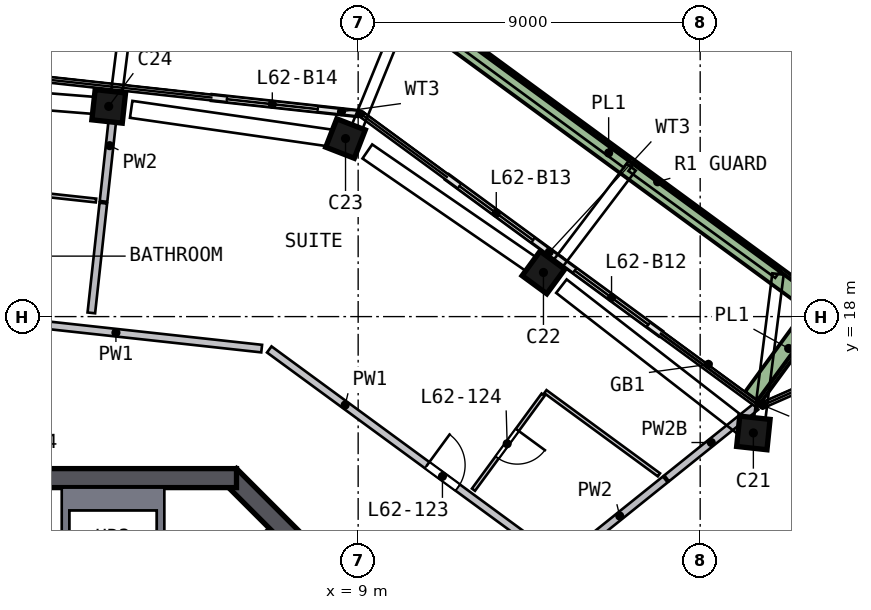
"""IFC4 building model, lengths in metres.
Left out: names, types, materials, properties, quantities, classifications, styles, units other than length and angle.
Written with IfcOpenShell. Run it as: python <this file> out.ifc"""

import sys

from ifc_helpers import new_model, si_unit, direction, frame, frame_2d, origin, origin_2d, place, context, subcontext, project, spatial, polyline, rectangle, outline, extrude, element, fill, save


model = new_model("IFC4")
c1 = context("Model", 3, precision=1e-05, world=origin(), true_north=direction((0.0, 1.0)))
c2 = subcontext(c1, "Body", "Model", "MODEL_VIEW")
j1 = project(units=[si_unit("LENGTHUNIT", "METRE"), si_unit("PLANEANGLEUNIT", "RADIAN")], contexts=[c1])
p1 = place(None, origin())
s1 = spatial("IfcSite", under=j1, at=p1, CompositionType="ELEMENT")
p2 = place(p1, origin())
s2 = spatial("IfcBuilding", under=s1, at=p2, CompositionType="ELEMENT")
p3 = place(p2, frame((0.0, 0.0, 252.5)))
s3 = spatial("IfcBuildingStorey", under=s2, at=p3, CompositionType="ELEMENT", Elevation=252.5)
p4 = place(p3, frame((19.485, 14.828, 0.0), z_axis=(-0.071225443, 0.092053374, 0.99320346), x_axis=(0.991526611, -0.101914305, 0.080550946)))
e1 = element("IfcColumn", 1, at=p4, inside=s3, PredefinedType="COLUMN", context=c2, shape_type="SweptSolid", body=[
    extrude(rectangle(XDim=0.8, YDim=0.8, at=origin_2d()), origin(), (0.0, 0.0, 1.0), 3.212),
])
p5 = place(p3, frame((13.986, 19.082, 0.0), z_axis=(-0.09133384, 0.065781659, 0.99364526), x_axis=(-0.80133178, 0.587536537, -0.112553082)))
e2 = element("IfcColumn", 2, at=p5, inside=s3, PredefinedType="COLUMN", context=c2, shape_type="SweptSolid", body=[
    extrude(rectangle(XDim=0.8, YDim=0.8, at=origin_2d()), origin(), (0.0, 0.0, 1.0), 3.21),
])
p6 = place(p3, frame((8.798, 22.636, 0.0), z_axis=(-0.107952091, 0.040976181, 0.99331128), x_axis=(0.925635524, -0.360370814, 0.115463211)))
e3 = element("IfcColumn", 3, at=p6, inside=s3, PredefinedType="COLUMN", context=c2, shape_type="SweptSolid", body=[
    extrude(rectangle(XDim=0.8, YDim=0.8, at=origin_2d()), origin(), (0.0, 0.0, 1.0), 3.211),
])
p7 = place(p3, frame((2.572, 23.518, 0.0), z_axis=(-0.112018614, 0.011255095, 0.993642367), x_axis=(-0.987786416, 0.107722097, -0.112578621)))
e4 = element("IfcColumn", 4, at=p7, inside=s3, PredefinedType="COLUMN", context=c2, shape_type="SweptSolid", body=[
    extrude(rectangle(XDim=0.8, YDim=0.8, at=origin_2d()), origin(), (0.0, 0.0, 1.0), 3.21),
])
p8 = place(p3, frame((13.823, 5.622, 0.0), z_axis=(0.0, 0.0, 1.0), x_axis=(-0.707106781, 0.707106781, 0.0)))
e5 = element("IfcWall", 5, at=p8, inside=s3, PredefinedType="SHEAR", context=c2, shape_type="SweptSolid", body=[
    extrude(rectangle(XDim=11.598, YDim=0.5, at=frame_2d((5.799, 0.0))), origin(), (0.0, 0.0, 1.0), 3.5),
])
p9 = place(p8, frame((2.099, 0.0, 0.0)))
e6 = element("IfcOpeningElement", 6, at=p9, cuts=e5, PredefinedType="OPENING", context=c2, shape_type="SweptSolid", body=[
    extrude(rectangle(XDim=1.2, YDim=2.1, at=frame_2d((0.6, 1.05))), frame((0.0, 0.26, 0.0), z_axis=(0.0, -1.0, 0.0), x_axis=(1.0, 0.0, 0.0)), (0.0, 0.0, 1.0), 0.52),
])
p10 = place(p3, frame((5.799, 13.75, 0.0), z_axis=(0.0, 0.0, 1.0), x_axis=(-1.0, 0.0, 0.0)))
e7 = element("IfcWall", 7, at=p10, inside=s3, PredefinedType="SHEAR", context=c2, shape_type="SweptSolid", body=[
    extrude(rectangle(XDim=11.598, YDim=0.5, at=frame_2d((5.799, 0.0))), origin(), (0.0, 0.0, 1.0), 3.5),
])
p11 = place(p10, frame((4.899, 0.0, 0.0)))
e8 = element("IfcOpeningElement", 8, at=p11, cuts=e7, PredefinedType="OPENING", context=c2, shape_type="SweptSolid", body=[
    extrude(rectangle(XDim=1.8, YDim=2.1, at=frame_2d((0.9, 1.05))), frame((0.0, 0.26, 0.0), z_axis=(0.0, -1.0, 0.0), x_axis=(1.0, 0.0, 0.0)), (0.0, 0.0, 1.0), 0.52),
])
p12 = place(p3, frame((16.958, 17.554, 0.0), z_axis=(0.0, 0.0, 1.0), x_axis=(-0.806539039, 0.591180835, 0.0)))
e9 = element("IfcWall", 9, at=p12, inside=s3, PredefinedType="SOLIDWALL", context=c2, shape_type="SweptSolid", body=[
    extrude(rectangle(XDim=3.3, YDim=0.15, at=frame_2d((1.65, 0.0))), origin(), (0.0, 0.0, 1.0), 2.525),
])
p13 = place(p12, frame((0.4, 0.0, 0.0)))
e10 = element("IfcOpeningElement", 10, at=p13, cuts=e9, PredefinedType="OPENING", context=c2, shape_type="SweptSolid", body=[
    extrude(rectangle(XDim=2.4, YDim=2.4, at=frame_2d((1.2, 1.2))), frame((0.0, 0.085, 0.0), z_axis=(0.0, -1.0, 0.0), x_axis=(1.0, 0.0, 0.0)), (0.0, 0.0, 1.0), 0.17),
])
p14 = place(p3, frame((14.296, 19.505, 0.0), z_axis=(0.0, 0.0, 1.0), x_axis=(-0.806553373, 0.591161278, 0.0)))
e11 = element("IfcWall", 11, at=p14, inside=s3, PredefinedType="SOLIDWALL", context=c2, shape_type="SweptSolid", body=[
    extrude(rectangle(XDim=3.661, YDim=0.15, at=frame_2d((1.831, 0.0))), origin(), (0.0, 0.0, 1.0), 2.525),
])
p15 = place(p14, frame((0.861, 0.0, 0.0)))
e12 = element("IfcOpeningElement", 12, at=p15, cuts=e11, PredefinedType="OPENING", context=c2, shape_type="SweptSolid", body=[
    extrude(rectangle(XDim=2.4, YDim=2.4, at=frame_2d((1.2, 1.2))), frame((0.0, 0.085, 0.0), z_axis=(0.0, -1.0, 0.0), x_axis=(1.0, 0.0, 0.0)), (0.0, 0.0, 1.0), 0.17),
])
p16 = place(p3, frame((8.99, 23.344, 0.0), z_axis=(0.0, 0.0, 1.0), x_axis=(-0.994074893, 0.108697318, 0.0)))
e13 = element("IfcWall", 13, at=p16, inside=s3, PredefinedType="SOLIDWALL", context=c2, shape_type="SweptSolid", body=[
    extrude(rectangle(XDim=3.863, YDim=0.15, at=frame_2d((1.932, 0.0))), origin(), (0.0, 0.0, 1.0), 2.525),
])
p17 = place(p16, frame((1.063, 0.0, 0.0)))
e14 = element("IfcOpeningElement", 14, at=p17, cuts=e13, PredefinedType="OPENING", context=c2, shape_type="SweptSolid", body=[
    extrude(rectangle(XDim=2.4, YDim=2.4, at=frame_2d((1.2, 1.2))), frame((0.0, 0.085, 0.0), z_axis=(0.0, -1.0, 0.0), x_axis=(1.0, 0.0, 0.0)), (0.0, 0.0, 1.0), 0.17),
])
p18 = place(p3, frame((19.382, 15.872, 0.0), z_axis=(0.0, 0.0, 1.0), x_axis=(0.591171745, 0.806545701, 0.0)))
e15 = element("IfcWall", 15, at=p18, inside=s3, PredefinedType="SOLIDWALL", context=c2, shape_type="SweptSolid", body=[
    extrude(rectangle(XDim=3.199, YDim=0.5, at=frame_2d((1.6, 0.0))), origin(), (0.0, 0.0, 1.0), 0.7),
])
p19 = place(p3, frame((20.924, 18.398, 0.0), z_axis=(0.0, 0.0, 1.0), x_axis=(-0.806549363, 0.591166749, 0.0)))
e16 = element("IfcWall", 16, at=p19, inside=s3, PredefinedType="SOLIDWALL", context=c2, shape_type="SweptSolid", body=[
    extrude(rectangle(XDim=13.224, YDim=0.5, at=frame_2d((6.612, 0.0))), origin(), (0.0, 0.0, 1.0), 0.7),
])
p20 = place(p3, origin())
e17 = element("IfcWall", 17, at=p20, inside=s3, PredefinedType="SOLIDWALL", context=c2, shape_type="SweptSolid", body=[
    extrude(outline(polyline([(3.9, 9.9), (3.7, 9.9), (3.7, 12.9), (1.4, 12.9), (1.4, 9.9), (1.2, 9.9), (1.2, 13.5), (3.9, 13.5), (3.9, 9.9)])), origin(), (0.0, 0.0, 1.0), 3.19),
])
p21 = place(p3, frame((3.677, 9.334, 0.0), z_axis=(0.0, 0.0, 1.0), x_axis=(0.707078393, 0.707135168, 0.0)))
e18 = element("IfcWall", 18, at=p21, inside=s3, PredefinedType="SOLIDWALL", context=c2, shape_type="SweptSolid", body=[
    extrude(rectangle(XDim=4.3, YDim=0.2, at=frame_2d((2.15, 0.0))), origin(), (0.0, 0.0, 1.0), 3.19),
])
p22 = place(p3, frame((-2.601, 18.148, 0.0), z_axis=(0.0, 0.0, 1.0), x_axis=(0.994076214, -0.108685238, 0.0)))
e19 = element("IfcWall", 19, at=p22, inside=s3, PredefinedType="SOLIDWALL", context=c2, shape_type="SweptSolid", body=[
    extrude(rectangle(XDim=9.115, YDim=0.2, at=frame_2d((4.558, 0.0))), origin(), (0.0, 0.0, 1.0), 3.19),
])
p23 = place(p22, frame((0.2, 0.0, 0.0)))
e20 = element("IfcOpeningElement", 20, at=p23, cuts=e19, PredefinedType="OPENING", context=c2, shape_type="SweptSolid", body=[
    extrude(rectangle(XDim=1.0, YDim=2.1, at=frame_2d((0.5, 1.05))), frame((0.0, 0.11, 0.0), z_axis=(0.0, -1.0, 0.0), x_axis=(1.0, 0.0, 0.0)), (0.0, 0.0, 1.0), 0.22),
])
p24 = place(p3, frame((6.661, 17.135, 0.0), z_axis=(0.0, 0.0, 1.0), x_axis=(0.80654328, -0.591175049, 0.0)))
e21 = element("IfcWall", 21, at=p24, inside=s3, PredefinedType="SOLIDWALL", context=c2, shape_type="SweptSolid", body=[
    extrude(rectangle(XDim=9.316, YDim=0.2, at=frame_2d((4.658, 0.0))), origin(), (0.0, 0.0, 1.0), 3.19),
])
p25 = place(p24, frame((5.15, 0.0, 0.0)))
e22 = element("IfcOpeningElement", 22, at=p25, cuts=e21, PredefinedType="OPENING", context=c2, shape_type="SweptSolid", body=[
    extrude(rectangle(XDim=1.0, YDim=2.1, at=frame_2d((0.5, 1.05))), frame((0.0, 0.11, 0.0), z_axis=(0.0, -1.0, 0.0), x_axis=(1.0, 0.0, 0.0)), (0.0, 0.0, 1.0), 0.22),
])
p26 = place(p3, frame((1.979, 18.098, 0.0), z_axis=(0.0, 0.0, 1.0), x_axis=(0.108752544, 0.994068853, 0.0)))
e23 = element("IfcWall", 23, at=p26, inside=s3, PredefinedType="SOLIDWALL", context=c2, shape_type="SweptSolid", body=[
    extrude(rectangle(XDim=2.905, YDim=0.2, at=frame_2d((1.453, 0.0))), origin(), (0.0, 0.0, 1.0), 3.19),
])
p27 = place(p3, frame((2.3, 21.031, 0.0), z_axis=(0.0, 0.0, 1.0), x_axis=(0.10867934, 0.994076859, 0.0)))
e24 = element("IfcWall", 24, at=p27, inside=s3, PredefinedType="SOLIDWALL", context=c2, shape_type="SweptSolid", body=[
    extrude(rectangle(XDim=2.952, YDim=0.2, at=frame_2d((1.476, 0.0))), origin(), (0.0, 0.0, 1.0), 3.19),
])
p28 = place(p3, frame((14.685, 11.79, 0.0), z_axis=(0.0, 0.0, 1.0), x_axis=(0.779744275, 0.626098127, 0.0)))
e25 = element("IfcWall", 25, at=p28, inside=s3, PredefinedType="SOLIDWALL", context=c2, shape_type="SweptSolid", body=[
    extrude(rectangle(XDim=3.075, YDim=0.2, at=frame_2d((1.537, 0.0))), origin(), (0.0, 0.0, 1.0), 3.19),
])
p29 = place(p3, frame((17.118, 13.744, 0.0), z_axis=(0.0, 0.0, 1.0), x_axis=(0.779776076, 0.626058521, 0.0)))
e26 = element("IfcWall", 26, at=p29, inside=s3, PredefinedType="SOLIDWALL", context=c2, shape_type="SweptSolid", body=[
    extrude(rectangle(XDim=3.011, YDim=0.2, at=frame_2d((1.506, 0.0))), origin(), (0.0, 0.0, 1.0), 2.69),
])
p30 = place(p3, frame((15.788, 8.707, 0.0), z_axis=(0.0, 0.0, 1.0), x_axis=(0.915241254, 0.40290625, 0.0)))
e27 = element("IfcWall", 27, at=p30, inside=s3, PredefinedType="SOLIDWALL", context=c2, shape_type="SweptSolid", body=[
    extrude(rectangle(XDim=15.227, YDim=0.2, at=frame_2d((7.613, 0.0))), origin(), (0.0, 0.0, 1.0), 3.19),
])
p31 = place(p30, frame((4.75, 0.0, 0.0)))
e28 = element("IfcOpeningElement", 28, at=p31, cuts=e27, PredefinedType="OPENING", context=c2, shape_type="SweptSolid", body=[
    extrude(rectangle(XDim=1.0, YDim=2.1, at=frame_2d((0.5, 1.05))), frame((0.0, 0.11, 0.0), z_axis=(0.0, -1.0, 0.0), x_axis=(1.0, 0.0, 0.0)), (0.0, 0.0, 1.0), 0.22),
])
p32 = place(p3, frame((-0.583, 21.348, 0.0), z_axis=(0.0, 0.0, 1.0), x_axis=(0.994076272, -0.108684708, 0.0)))
e29 = element("IfcWall", 29, at=p32, inside=s3, PredefinedType="PARTITIONING", context=c2, shape_type="SweptSolid", body=[
    extrude(rectangle(XDim=2.7, YDim=0.1, at=frame_2d((1.35, 0.0))), origin(), (0.0, 0.0, 1.0), 3.19),
])
p33 = place(p3, frame((13.867, 15.945, 0.0), z_axis=(0.0, 0.0, 1.0), x_axis=(-0.591155368, -0.806557704, 0.0)))
e30 = element("IfcWall", 30, at=p33, inside=s3, PredefinedType="PARTITIONING", context=c2, shape_type="SweptSolid", body=[
    extrude(rectangle(XDim=3.1, YDim=0.1, at=frame_2d((1.55, 0.0))), origin(), (0.0, 0.0, 1.0), 3.19),
])
p34 = place(p33, frame((1.15, 0.0, 0.0)))
e31 = element("IfcOpeningElement", 31, at=p34, cuts=e30, PredefinedType="OPENING", context=c2, shape_type="SweptSolid", body=[
    extrude(rectangle(XDim=0.9, YDim=2.1, at=frame_2d((0.45, 1.05))), frame((0.0, 0.06, 0.0), z_axis=(0.0, -1.0, 0.0), x_axis=(1.0, 0.0, 0.0)), (0.0, 0.0, 1.0), 0.12),
])
p35 = place(p3, frame((13.926, 16.026, 0.0), z_axis=(0.0, 0.0, 1.0), x_axis=(0.806587268, -0.59111503, 0.0)))
e32 = element("IfcWall", 32, at=p35, inside=s3, PredefinedType="PARTITIONING", context=c2, shape_type="SweptSolid", body=[
    extrude(rectangle(XDim=3.704, YDim=0.1, at=frame_2d((1.852, 0.0))), origin(), (0.0, 0.0, 1.0), 3.19),
])
p36 = place(p13, origin())
e33 = element("IfcDoor", 33, at=p36, inside=s3, OperationType="SLIDING_TO_RIGHT", PredefinedType="DOOR", context=c2, shape_type="SweptSolid", body=[
    extrude(rectangle(XDim=2.4, YDim=2.4, at=frame_2d((1.2, 1.2))), frame((0.0, 0.025, 0.0), z_axis=(0.0, -1.0, 0.0), x_axis=(1.0, 0.0, 0.0)), (0.0, 0.0, 1.0), 0.05),
])
fill(e10, e33)
p37 = place(p15, origin())
e34 = element("IfcDoor", 34, at=p37, inside=s3, OperationType="SLIDING_TO_LEFT", PredefinedType="DOOR", context=c2, shape_type="SweptSolid", body=[
    extrude(rectangle(XDim=2.4, YDim=2.4, at=frame_2d((1.2, 1.2))), frame((0.0, 0.025, 0.0), z_axis=(0.0, -1.0, 0.0), x_axis=(1.0, 0.0, 0.0)), (0.0, 0.0, 1.0), 0.05),
])
fill(e12, e34)
p38 = place(p17, origin())
e35 = element("IfcDoor", 35, at=p38, inside=s3, OperationType="SLIDING_TO_LEFT", PredefinedType="DOOR", context=c2, shape_type="SweptSolid", body=[
    extrude(rectangle(XDim=2.4, YDim=2.4, at=frame_2d((1.2, 1.2))), frame((0.0, 0.025, 0.0), z_axis=(0.0, -1.0, 0.0), x_axis=(1.0, 0.0, 0.0)), (0.0, 0.0, 1.0), 0.05),
])
fill(e14, e35)
p39 = place(p25, origin())
e36 = element("IfcDoor", 36, at=p39, inside=s3, OperationType="SINGLE_SWING_LEFT", PredefinedType="DOOR", context=c2, shape_type="SweptSolid", body=[
    extrude(rectangle(XDim=1.0, YDim=2.1, at=frame_2d((0.5, 1.05))), frame((0.0, 0.025, 0.0), z_axis=(0.0, -1.0, 0.0), x_axis=(1.0, 0.0, 0.0)), (0.0, 0.0, 1.0), 0.05),
])
fill(e22, e36)
p40 = place(p34, origin())
e37 = element("IfcDoor", 37, at=p40, inside=s3, OperationType="SINGLE_SWING_LEFT", PredefinedType="DOOR", context=c2, shape_type="SweptSolid", body=[
    extrude(rectangle(XDim=0.9, YDim=2.1, at=frame_2d((0.45, 1.05))), frame((0.0, 0.025, 0.0), z_axis=(0.0, -1.0, 0.0), x_axis=(1.0, 0.0, 0.0)), (0.0, 0.0, 1.0), 0.05),
])
fill(e31, e37)
save(model, sys.argv[1])
